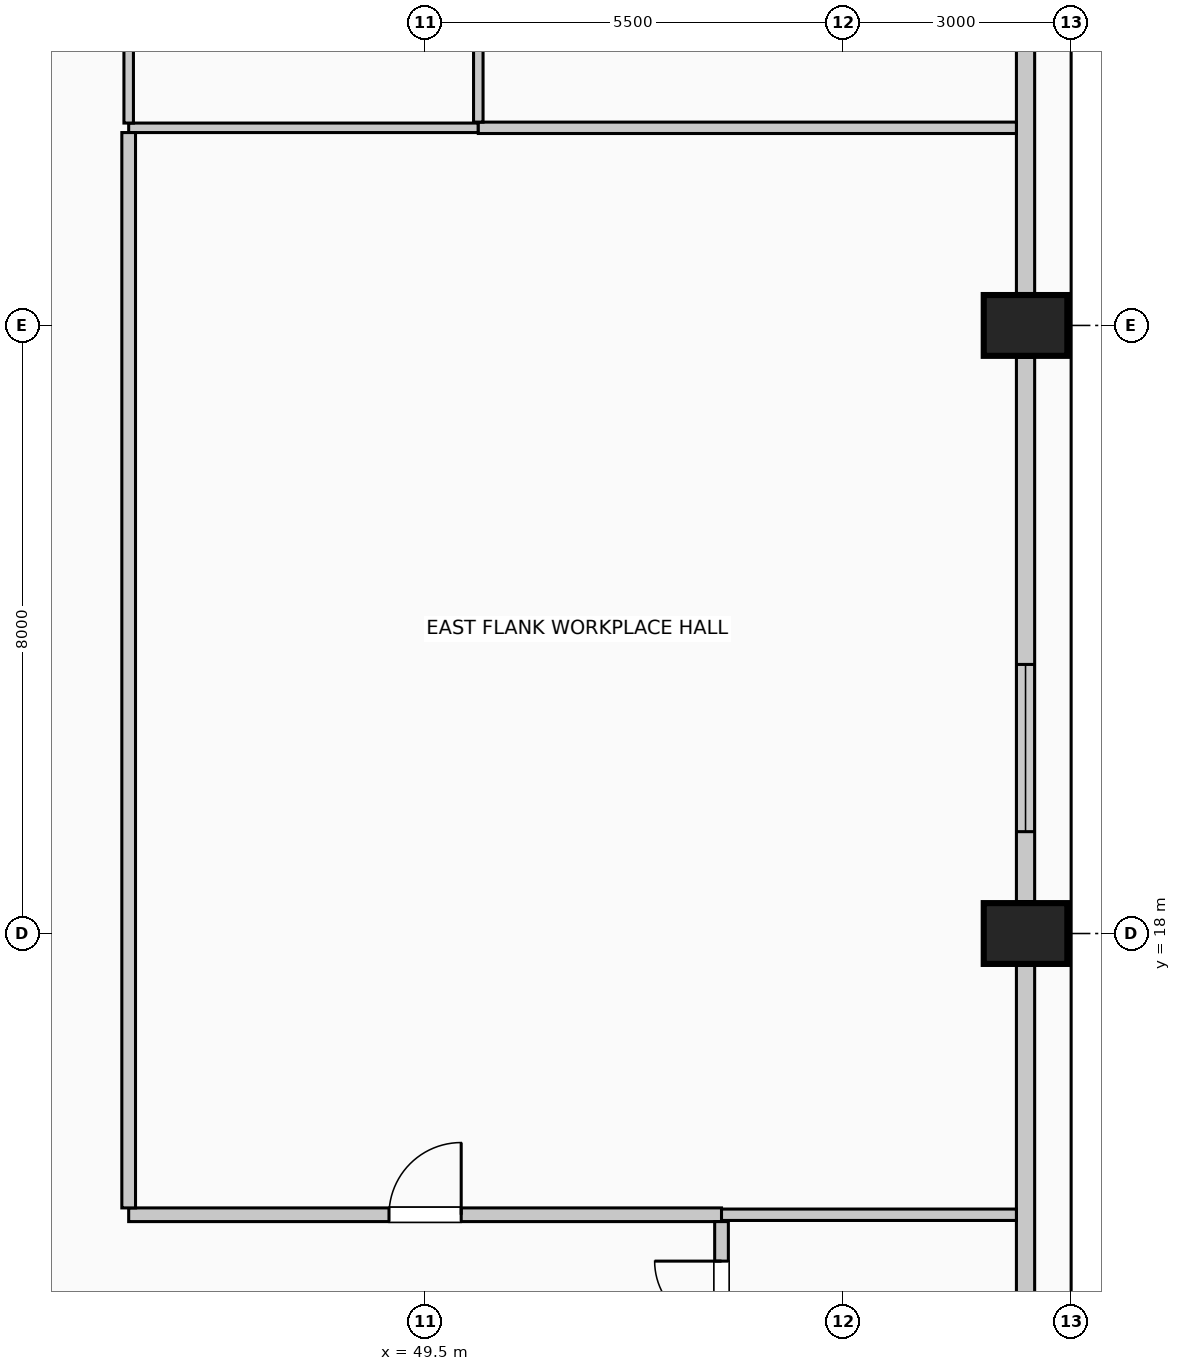
"""IFC4 building model, lengths in metres.
Left out: names, types, materials, properties, quantities, classifications, styles, units other than length and angle.
Written with IfcOpenShell. Run it as: python <this file> out.ifc"""

import sys

from ifc_helpers import new_model, si_unit, direction, frame, frame_2d, origin, origin_2d, place, context, subcontext, project, spatial, rectangle, extrude, element, fill, save


model = new_model("IFC4")
c1 = context("Model", 3, precision=1e-05, world=origin(), true_north=direction((0.0, 1.0)))
c2 = subcontext(c1, "Body", "Model", "MODEL_VIEW")
j1 = project(units=[si_unit("LENGTHUNIT", "METRE"), si_unit("PLANEANGLEUNIT", "RADIAN")], contexts=[c1])
p1 = place(None, origin())
s1 = spatial("IfcSite", under=j1, at=p1, CompositionType="ELEMENT")
p2 = place(p1, origin())
s2 = spatial("IfcBuilding", under=s1, at=p2, CompositionType="ELEMENT")
p3 = place(p2, frame((0.0, 0.0, 190.6)))
s3 = spatial("IfcBuildingStorey", under=s2, at=p3, CompositionType="ELEMENT", Elevation=190.6)
for number, where, z_axis, x_axis in (
    (1, (57.4, 18.0, 0.0), (0.0, 0.0, 1.0), (0.0, 1.0, 0.0)),
    (2, (57.4, 26.0, 0.0), (0.0, 0.0, 1.0), (0.0, 1.0, 0.0)),
):
    element("IfcColumn", number, at=place(p3, frame(where, z_axis=z_axis, x_axis=x_axis)), inside=s3, PredefinedType="COLUMN", context=c2, shape_type="SweptSolid", body=[
        extrude(rectangle(XDim=0.8, YDim=1.1, at=origin_2d()), origin(), (0.0, 0.0, 1.0), 4.0),
    ])
p4 = place(p3, frame((57.4, 17.58, 0.0), z_axis=(0.0, 0.0, 1.0), x_axis=(0.0, -1.0, 0.0)))
e3 = element("IfcWall", 3, at=p4, inside=s3, PredefinedType="SOLIDWALL", context=c2, shape_type="SweptSolid", body=[
    extrude(rectangle(XDim=7.16, YDim=0.24, at=frame_2d((3.58, 0.0))), origin(), (0.0, 0.0, 1.0), 3.0),
])
p5 = place(p3, frame((57.4, 25.58, 0.0), z_axis=(0.0, 0.0, 1.0), x_axis=(0.0, -1.0, 0.0)))
e4 = element("IfcWall", 4, at=p5, inside=s3, PredefinedType="SOLIDWALL", context=c2, shape_type="SweptSolid", body=[
    extrude(rectangle(XDim=7.16, YDim=0.24, at=frame_2d((3.58, 0.0))), origin(), (0.0, 0.0, 1.0), 3.0),
])
p6 = place(p5, frame((4.04, 0.0, 0.42)))
e5 = element("IfcOpeningElement", 5, at=p6, cuts=e4, PredefinedType="OPENING", context=c2, shape_type="SweptSolid", body=[
    extrude(rectangle(XDim=2.2, YDim=1.95, at=frame_2d((1.1, 0.975))), frame((0.0, 0.13, 0.0), z_axis=(0.0, -1.0, 0.0), x_axis=(1.0, 0.0, 0.0)), (0.0, 0.0, 1.0), 0.26),
])
p7 = place(p3, frame((57.4, 33.58, 0.0), z_axis=(0.0, 0.0, 1.0), x_axis=(0.0, -1.0, 0.0)))
e6 = element("IfcWall", 6, at=p7, inside=s3, PredefinedType="SOLIDWALL", context=c2, shape_type="SweptSolid", body=[
    extrude(rectangle(XDim=7.16, YDim=0.24, at=frame_2d((3.58, 0.0))), origin(), (0.0, 0.0, 1.0), 3.0),
])
p8 = place(p3, frame((45.6, 14.3, 0.0), z_axis=(0.0, 0.0, 1.0), x_axis=(1.0, 0.0, 0.0)))
e7 = element("IfcWall", 7, at=p8, inside=s3, PredefinedType="PARTITIONING", context=c2, shape_type="SweptSolid", body=[
    extrude(rectangle(XDim=7.8, YDim=0.18, at=frame_2d((3.9, 0.0))), origin(), (0.0, 0.0, 1.0), 3.75),
])
p9 = place(p8, frame((3.425, 0.0, 0.0)))
e8 = element("IfcOpeningElement", 8, at=p9, cuts=e7, PredefinedType="OPENING", context=c2, shape_type="SweptSolid", body=[
    extrude(rectangle(XDim=0.95, YDim=2.15, at=frame_2d((0.475, 1.075))), frame((0.0, 0.1, 0.0), z_axis=(0.0, -1.0, 0.0), x_axis=(1.0, 0.0, 0.0)), (0.0, 0.0, 1.0), 0.2),
])
p10 = place(p3, frame((53.4, 14.3, 0.0), z_axis=(0.0, 0.0, 1.0), x_axis=(1.0, 0.0, 0.0)))
e9 = element("IfcWall", 9, at=p10, inside=s3, PredefinedType="PARTITIONING", context=c2, shape_type="SweptSolid", body=[
    extrude(rectangle(XDim=3.88, YDim=0.15, at=frame_2d((1.94, 0.0))), origin(), (0.0, 0.0, 1.0), 3.75),
])
p11 = place(p3, frame((45.6, 28.6, 0.0), z_axis=(0.0, 0.0, 1.0), x_axis=(1.0, 0.0, 0.0)))
e10 = element("IfcWall", 10, at=p11, inside=s3, PredefinedType="PARTITIONING", context=c2, shape_type="SweptSolid", body=[
    extrude(rectangle(XDim=4.6, YDim=0.125, at=frame_2d((2.3, 0.0))), origin(), (0.0, 0.0, 1.0), 3.75),
])
p12 = place(p3, frame((50.2, 28.6, 0.0), z_axis=(0.0, 0.0, 1.0), x_axis=(1.0, 0.0, 0.0)))
e11 = element("IfcWall", 11, at=p12, inside=s3, PredefinedType="PARTITIONING", context=c2, shape_type="SweptSolid", body=[
    extrude(rectangle(XDim=7.08, YDim=0.15, at=frame_2d((3.54, 0.0))), origin(), (0.0, 0.0, 1.0), 3.75),
])
p13 = place(p3, frame((45.6, 14.39, 0.0), z_axis=(0.0, 0.0, 1.0), x_axis=(0.0, 1.0, 0.0)))
e12 = element("IfcWall", 12, at=p13, inside=s3, PredefinedType="PARTITIONING", context=c2, shape_type="SweptSolid", body=[
    extrude(rectangle(XDim=14.148, YDim=0.18, at=frame_2d((7.074, 0.0))), origin(), (0.0, 0.0, 1.0), 3.75),
])
p14 = place(p3, frame((45.6, 28.663, 0.0), z_axis=(0.0, 0.0, 1.0), x_axis=(0.0, 1.0, 0.0)))
e13 = element("IfcWall", 13, at=p14, inside=s3, PredefinedType="PARTITIONING", context=c2, shape_type="SweptSolid", body=[
    extrude(rectangle(XDim=3.625, YDim=0.125, at=frame_2d((1.812, 0.0))), origin(), (0.0, 0.0, 1.0), 3.75),
])
p15 = place(p3, frame((50.2, 28.675, 0.0), z_axis=(0.0, 0.0, 1.0), x_axis=(0.0, 1.0, 0.0)))
e14 = element("IfcWall", 14, at=p15, inside=s3, PredefinedType="PARTITIONING", context=c2, shape_type="SweptSolid", body=[
    extrude(rectangle(XDim=3.6, YDim=0.125, at=frame_2d((1.8, 0.0))), origin(), (0.0, 0.0, 1.0), 3.75),
])
p16 = place(p3, frame((53.4, 12.29, 0.0), z_axis=(0.0, 0.0, 1.0), x_axis=(0.0, 1.0, 0.0)))
e15 = element("IfcWall", 15, at=p16, inside=s3, PredefinedType="PARTITIONING", context=c2, shape_type="SweptSolid", body=[
    extrude(rectangle(XDim=1.92, YDim=0.18, at=frame_2d((0.96, 0.0))), origin(), (0.0, 0.0, 1.0), 3.75),
])
p17 = place(p16, frame((0.52, 0.0, 0.0)))
e16 = element("IfcOpeningElement", 16, at=p17, cuts=e15, PredefinedType="OPENING", context=c2, shape_type="SweptSolid", body=[
    extrude(rectangle(XDim=0.88, YDim=2.1, at=frame_2d((0.44, 1.05))), frame((0.0, 0.1, 0.0), z_axis=(0.0, -1.0, 0.0), x_axis=(1.0, 0.0, 0.0)), (0.0, 0.0, 1.0), 0.2),
])
p18 = place(p6, origin())
e17 = element("IfcWindow", 17, at=p18, inside=s3, PartitioningType="SINGLE_PANEL", PredefinedType="WINDOW", context=c2, shape_type="SweptSolid", body=[
    extrude(rectangle(XDim=2.2, YDim=1.95, at=frame_2d((1.1, 0.975))), frame((0.0, 0.03, 0.0), z_axis=(0.0, -1.0, 0.0), x_axis=(1.0, 0.0, 0.0)), (0.0, 0.0, 1.0), 0.06),
])
fill(e5, e17)
p19 = place(p9, origin())
e18 = element("IfcDoor", 18, at=p19, inside=s3, OperationType="SINGLE_SWING_RIGHT", PredefinedType="DOOR", context=c2, shape_type="SweptSolid", body=[
    extrude(rectangle(XDim=0.95, YDim=2.15, at=frame_2d((0.475, 1.075))), frame((0.0, 0.025, 0.0), z_axis=(0.0, -1.0, 0.0), x_axis=(1.0, 0.0, 0.0)), (0.0, 0.0, 1.0), 0.05),
])
fill(e8, e18)
p20 = place(p17, origin())
e19 = element("IfcDoor", 19, at=p20, inside=s3, OperationType="SINGLE_SWING_RIGHT", PredefinedType="DOOR", context=c2, shape_type="SweptSolid", body=[
    extrude(rectangle(XDim=0.88, YDim=2.1, at=frame_2d((0.44, 1.05))), frame((0.0, 0.025, 0.0), z_axis=(0.0, -1.0, 0.0), x_axis=(1.0, 0.0, 0.0)), (0.0, 0.0, 1.0), 0.05),
])
fill(e16, e19)
save(model, sys.argv[1])
